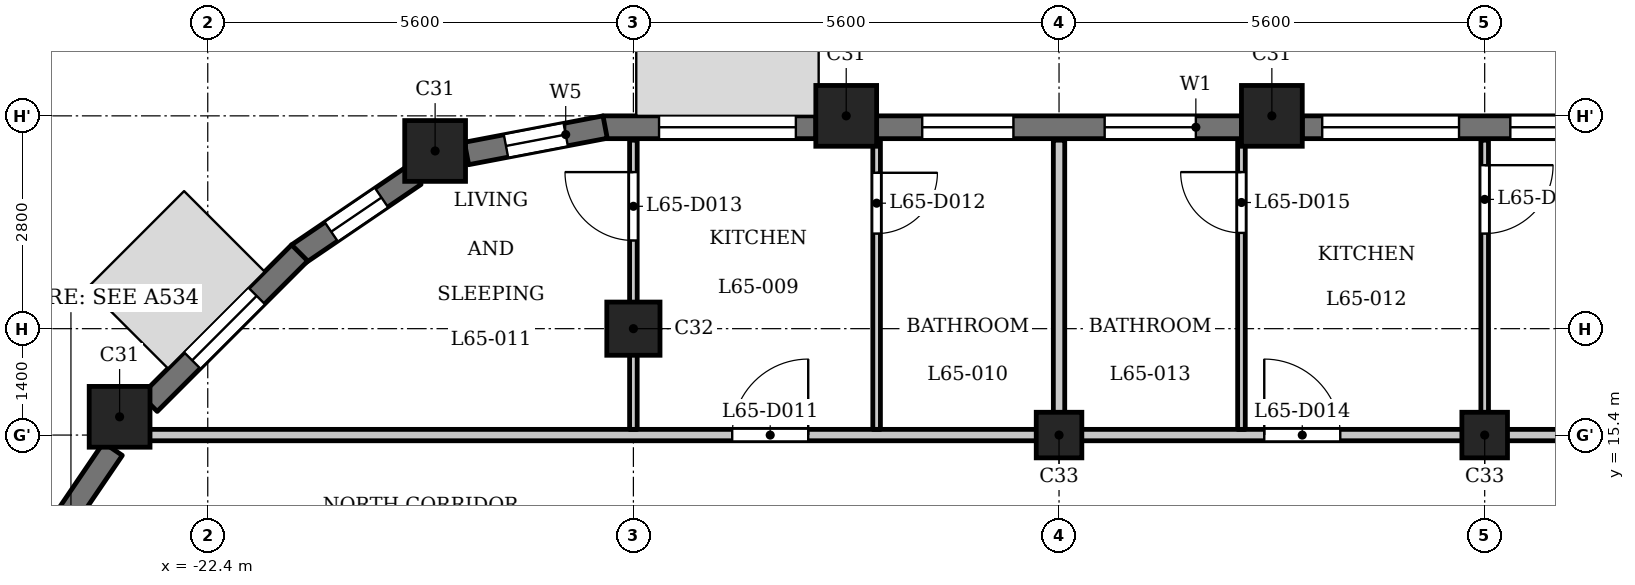
"""IFC4 building model, lengths in metres.
Left out: names, types, materials, properties, quantities, classifications, styles, units other than length and angle.
Written with IfcOpenShell. Run it as: python <this file> out.ifc"""

import sys

from ifc_helpers import new_model, si_unit, direction, frame, frame_2d, origin, origin_2d, place, context, subcontext, project, spatial, rectangle, extrude, element, fill, save


model = new_model("IFC4")
c1 = context("Model", 3, precision=1e-05, world=origin(), true_north=direction((0.0, 1.0)))
c2 = subcontext(c1, "Body", "Model", "MODEL_VIEW")
j1 = project(units=[si_unit("LENGTHUNIT", "METRE"), si_unit("PLANEANGLEUNIT", "RADIAN")], contexts=[c1])
p1 = place(None, origin())
s1 = spatial("IfcSite", under=j1, at=p1, CompositionType="ELEMENT")
p2 = place(p1, origin())
s2 = spatial("IfcBuilding", under=s1, at=p2, CompositionType="ELEMENT")
p3 = place(p2, frame((0.0, 0.0, 252.2)))
s3 = spatial("IfcBuildingStorey", under=s2, at=p3, CompositionType="ELEMENT", Elevation=252.2)
for number, where, z_axis, x_axis in (
    (1, (-8.4, 19.6, 0.0), (0.0, 0.0, 1.0), (1.0, 0.0, 0.0)),
    (2, (-14.0, 19.6, 0.0), (0.0, 0.0, 1.0), (1.0, 0.0, 0.0)),
    (3, (-19.409, 19.138, 0.0), (0.0, 0.0, 1.0), (1.0, 0.0, 0.0)),
    (4, (-23.56, 15.64, 0.0), (0.0, 0.0, 1.0), (1.0, 0.0, 0.0)),
):
    element("IfcColumn", number, at=place(p3, frame(where, z_axis=z_axis, x_axis=x_axis)), inside=s3, PredefinedType="COLUMN", context=c2, shape_type="SweptSolid", body=[
        extrude(rectangle(XDim=0.8, YDim=0.8, at=origin_2d()), origin(), (0.0, 0.0, 1.0), 3.5),
    ])
p4 = place(p3, frame((-16.8, 16.8, 0.0), z_axis=(0.0, 0.0, 1.0), x_axis=(1.0, 0.0, 0.0)))
e5 = element("IfcColumn", 5, at=p4, inside=s3, PredefinedType="COLUMN", context=c2, shape_type="SweptSolid", body=[
    extrude(rectangle(XDim=0.7, YDim=0.7, at=origin_2d()), origin(), (0.0, 0.0, 1.0), 3.5),
])
for number, where, z_axis, x_axis in (
    (6, (-11.2, 15.4, 0.0), (0.0, 0.0, 1.0), (1.0, 0.0, 0.0)),
    (7, (-5.6, 15.4, 0.0), (0.0, 0.0, 1.0), (1.0, 0.0, 0.0)),
):
    element("IfcColumn", number, at=place(p3, frame(where, z_axis=z_axis, x_axis=x_axis)), inside=s3, PredefinedType="COLUMN", context=c2, shape_type="SweptSolid", body=[
        extrude(rectangle(XDim=0.6, YDim=0.6, at=origin_2d()), origin(), (0.0, 0.0, 1.0), 3.5),
    ])
p5 = place(p3, frame((-3.2, 19.45, 0.0), z_axis=(0.0, 0.0, 1.0), x_axis=(-1.0, 0.0, 0.0)))
e8 = element("IfcWall", 8, at=p5, inside=s3, PredefinedType="SOLIDWALL", context=c2, shape_type="SweptSolid", body=[
    extrude(rectangle(XDim=4.8, YDim=0.3, at=frame_2d((2.4, 0.0))), origin(), (0.0, 0.0, 1.0), 2.55),
])
p6 = place(p5, frame((0.262, 0.0, 0.9)))
e9 = element("IfcOpeningElement", 9, at=p6, cuts=e8, PredefinedType="OPENING", context=c2, shape_type="SweptSolid", body=[
    extrude(rectangle(XDim=1.8, YDim=1.25, at=frame_2d((0.9, 0.625))), frame((0.0, 0.16, 0.0), z_axis=(0.0, -1.0, 0.0), x_axis=(1.0, 0.0, 0.0)), (0.0, 0.0, 1.0), 0.32),
])
p7 = place(p5, frame((2.738, 0.0, 0.9)))
e10 = element("IfcOpeningElement", 10, at=p7, cuts=e8, PredefinedType="OPENING", context=c2, shape_type="SweptSolid", body=[
    extrude(rectangle(XDim=1.8, YDim=1.25, at=frame_2d((0.9, 0.625))), frame((0.0, 0.16, 0.0), z_axis=(0.0, -1.0, 0.0), x_axis=(1.0, 0.0, 0.0)), (0.0, 0.0, 1.0), 0.32),
])
p8 = place(p3, frame((-8.8, 19.45, 0.0), z_axis=(0.0, 0.0, 1.0), x_axis=(-1.0, 0.0, 0.0)))
e11 = element("IfcWall", 11, at=p8, inside=s3, PredefinedType="SOLIDWALL", context=c2, shape_type="SweptSolid", body=[
    extrude(rectangle(XDim=4.8, YDim=0.3, at=frame_2d((2.4, 0.0))), origin(), (0.0, 0.0, 1.0), 2.55),
])
p9 = place(p8, frame((0.6, 0.0, 0.6)))
e12 = element("IfcOpeningElement", 12, at=p9, cuts=e11, PredefinedType="OPENING", context=c2, shape_type="SweptSolid", body=[
    extrude(rectangle(XDim=1.2, YDim=1.55, at=frame_2d((0.6, 0.775))), frame((0.0, 0.16, 0.0), z_axis=(0.0, -1.0, 0.0), x_axis=(1.0, 0.0, 0.0)), (0.0, 0.0, 1.0), 0.32),
])
p10 = place(p8, frame((3.0, 0.0, 0.6)))
e13 = element("IfcOpeningElement", 13, at=p10, cuts=e11, PredefinedType="OPENING", context=c2, shape_type="SweptSolid", body=[
    extrude(rectangle(XDim=1.2, YDim=1.55, at=frame_2d((0.6, 0.775))), frame((0.0, 0.16, 0.0), z_axis=(0.0, -1.0, 0.0), x_axis=(1.0, 0.0, 0.0)), (0.0, 0.0, 1.0), 0.32),
])
p11 = place(p3, frame((-14.4, 19.45, 0.0), z_axis=(0.0, 0.0, 1.0), x_axis=(-1.0, 0.0, 0.0)))
e14 = element("IfcWall", 14, at=p11, inside=s3, PredefinedType="SOLIDWALL", context=c2, shape_type="SweptSolid", body=[
    extrude(rectangle(XDim=2.8, YDim=0.3, at=frame_2d((1.4, 0.0))), origin(), (0.0, 0.0, 1.0), 2.55),
])
p12 = place(p11, frame((0.262, 0.0, 0.9)))
e15 = element("IfcOpeningElement", 15, at=p12, cuts=e14, PredefinedType="OPENING", context=c2, shape_type="SweptSolid", body=[
    extrude(rectangle(XDim=1.8, YDim=1.25, at=frame_2d((0.9, 0.625))), frame((0.0, 0.16, 0.0), z_axis=(0.0, -1.0, 0.0), x_axis=(1.0, 0.0, 0.0)), (0.0, 0.0, 1.0), 0.32),
])
p13 = place(p3, frame((-17.172, 19.453, 0.0), z_axis=(0.0, 0.0, 1.0), x_axis=(-0.982301706131, -0.187305520826, 0.0)))
e16 = element("IfcWall", 16, at=p13, inside=s3, PredefinedType="SOLIDWALL", context=c2, shape_type="SweptSolid", body=[
    extrude(rectangle(XDim=1.856, YDim=0.3, at=frame_2d((0.928, 0.0))), origin(), (0.0, 0.0, 1.0), 2.55),
])
p14 = place(p13, frame((0.528, 0.0, 0.6)))
e17 = element("IfcOpeningElement", 17, at=p14, cuts=e16, PredefinedType="OPENING", context=c2, shape_type="SweptSolid", body=[
    extrude(rectangle(XDim=0.8, YDim=1.55, at=frame_2d((0.4, 0.775))), frame((0.0, 0.16, 0.0), z_axis=(0.0, -1.0, 0.0), x_axis=(1.0, 0.0, 0.0)), (0.0, 0.0, 1.0), 0.32),
])
p15 = place(p3, frame((-19.678, 18.822, 0.0), z_axis=(0.0, 0.0, 1.0), x_axis=(-0.826997446962, -0.562205676526, 0.0)))
e18 = element("IfcWall", 18, at=p15, inside=s3, PredefinedType="SOLIDWALL", context=c2, shape_type="SweptSolid", body=[
    extrude(rectangle(XDim=1.856, YDim=0.3, at=frame_2d((0.928, 0.0))), origin(), (0.0, 0.0, 1.0), 2.55),
])
p16 = place(p15, frame((0.528, 0.0, 0.6)))
e19 = element("IfcOpeningElement", 19, at=p16, cuts=e18, PredefinedType="OPENING", context=c2, shape_type="SweptSolid", body=[
    extrude(rectangle(XDim=0.8, YDim=1.55, at=frame_2d((0.4, 0.775))), frame((0.0, 0.16, 0.0), z_axis=(0.0, -1.0, 0.0), x_axis=(1.0, 0.0, 0.0)), (0.0, 0.0, 1.0), 0.32),
])
p17 = place(p3, frame((-21.191, 17.797, 0.0), z_axis=(0.0, 0.0, 1.0), x_axis=(-0.707106781187, -0.707106781187, 0.0)))
e20 = element("IfcWall", 20, at=p17, inside=s3, PredefinedType="SOLIDWALL", context=c2, shape_type="SweptSolid", body=[
    extrude(rectangle(XDim=2.8, YDim=0.3, at=frame_2d((1.4, 0.0))), origin(), (0.0, 0.0, 1.0), 2.55),
])
p18 = place(p17, frame((0.8, 0.0, 0.6)))
e21 = element("IfcOpeningElement", 21, at=p18, cuts=e20, PredefinedType="OPENING", context=c2, shape_type="SweptSolid", body=[
    extrude(rectangle(XDim=1.2, YDim=1.55, at=frame_2d((0.6, 0.775))), frame((0.0, 0.16, 0.0), z_axis=(0.0, -1.0, 0.0), x_axis=(1.0, 0.0, 0.0)), (0.0, 0.0, 1.0), 0.32),
])
p19 = place(p3, frame((-23.648, 15.217, 0.0), z_axis=(0.0, 0.0, 1.0), x_axis=(-0.562043265151, -0.827107833416, 0.0)))
e22 = element("IfcWall", 22, at=p19, inside=s3, PredefinedType="SOLIDWALL", context=c2, shape_type="SweptSolid", body=[
    extrude(rectangle(XDim=1.377, YDim=0.3, at=frame_2d((0.688, 0.0))), origin(), (0.0, 0.0, 1.0), 2.55),
])
p20 = place(p3, frame((-23.55, 15.4, 0.0), z_axis=(0.0, 0.0, 1.0), x_axis=(1.0, 0.0, 0.0)))
e23 = element("IfcWall", 23, at=p20, inside=s3, PredefinedType="PARTITIONING", context=c2, shape_type="SweptSolid", body=[
    extrude(rectangle(XDim=46.872, YDim=0.15, at=frame_2d((23.436, 0.0))), origin(), (0.0, 0.0, 1.0), 3.2),
])
p21 = place(p20, frame((8.05, 0.0, 0.0)))
e24 = element("IfcOpeningElement", 24, at=p21, cuts=e23, PredefinedType="OPENING", context=c2, shape_type="SweptSolid", body=[
    extrude(rectangle(XDim=1.0, YDim=2.1, at=frame_2d((0.5, 1.05))), frame((0.0, 0.085, 0.0), z_axis=(0.0, -1.0, 0.0), x_axis=(1.0, 0.0, 0.0)), (0.0, 0.0, 1.0), 0.17),
])
p22 = place(p20, frame((15.05, 0.0, 0.0)))
e25 = element("IfcOpeningElement", 25, at=p22, cuts=e23, PredefinedType="OPENING", context=c2, shape_type="SweptSolid", body=[
    extrude(rectangle(XDim=1.0, YDim=2.1, at=frame_2d((0.5, 1.05))), frame((0.0, 0.085, 0.0), z_axis=(0.0, -1.0, 0.0), x_axis=(1.0, 0.0, 0.0)), (0.0, 0.0, 1.0), 0.17),
])
p23 = place(p20, frame((30.95, 0.0, 0.0)))
e26 = element("IfcOpeningElement", 26, at=p23, cuts=e23, PredefinedType="OPENING", context=c2, shape_type="SweptSolid", body=[
    extrude(rectangle(XDim=1.0, YDim=2.1, at=frame_2d((0.5, 1.05))), frame((0.0, 0.085, 0.0), z_axis=(0.0, -1.0, 0.0), x_axis=(1.0, 0.0, 0.0)), (0.0, 0.0, 1.0), 0.17),
])
p24 = place(p20, frame((38.2, 0.0, 0.0)))
e27 = element("IfcOpeningElement", 27, at=p24, cuts=e23, PredefinedType="OPENING", context=c2, shape_type="SweptSolid", body=[
    extrude(rectangle(XDim=1.0, YDim=2.1, at=frame_2d((0.5, 1.05))), frame((0.0, 0.085, 0.0), z_axis=(0.0, -1.0, 0.0), x_axis=(1.0, 0.0, 0.0)), (0.0, 0.0, 1.0), 0.17),
])
p25 = place(p3, frame((-16.8, 15.475, 0.0), z_axis=(0.0, 0.0, 1.0), x_axis=(0.0, 1.0, 0.0)))
e28 = element("IfcWall", 28, at=p25, inside=s3, PredefinedType="PARTITIONING", context=c2, shape_type="SweptSolid", body=[
    extrude(rectangle(XDim=3.805, YDim=0.1, at=frame_2d((1.902, 0.0))), origin(), (0.0, 0.0, 1.0), 3.2),
])
p26 = place(p25, frame((2.485, 0.0, 0.0)))
e29 = element("IfcOpeningElement", 29, at=p26, cuts=e28, PredefinedType="OPENING", context=c2, shape_type="SweptSolid", body=[
    extrude(rectangle(XDim=0.9, YDim=2.1, at=frame_2d((0.45, 1.05))), frame((0.0, 0.06, 0.0), z_axis=(0.0, -1.0, 0.0), x_axis=(1.0, 0.0, 0.0)), (0.0, 0.0, 1.0), 0.12),
])
p27 = place(p3, frame((-13.6, 15.475, 0.0), z_axis=(0.0, 0.0, 1.0), x_axis=(0.0, 1.0, 0.0)))
e30 = element("IfcWall", 30, at=p27, inside=s3, PredefinedType="PARTITIONING", context=c2, shape_type="SweptSolid", body=[
    extrude(rectangle(XDim=3.805, YDim=0.1, at=frame_2d((1.902, 0.0))), origin(), (0.0, 0.0, 1.0), 3.2),
])
p28 = place(p27, frame((2.576, 0.0, 0.0)))
e31 = element("IfcOpeningElement", 31, at=p28, cuts=e30, PredefinedType="OPENING", context=c2, shape_type="SweptSolid", body=[
    extrude(rectangle(XDim=0.8, YDim=2.1, at=frame_2d((0.4, 1.05))), frame((0.0, 0.06, 0.0), z_axis=(0.0, -1.0, 0.0), x_axis=(1.0, 0.0, 0.0)), (0.0, 0.0, 1.0), 0.12),
])
p29 = place(p3, frame((-11.2, 15.475, 0.0), z_axis=(0.0, 0.0, 1.0), x_axis=(0.0, 1.0, 0.0)))
e32 = element("IfcWall", 32, at=p29, inside=s3, PredefinedType="PARTITIONING", context=c2, shape_type="SweptSolid", body=[
    extrude(rectangle(XDim=3.805, YDim=0.15, at=frame_2d((1.902, 0.0))), origin(), (0.0, 0.0, 1.0), 3.2),
])
p30 = place(p3, frame((-8.8, 15.475, 0.0), z_axis=(0.0, 0.0, 1.0), x_axis=(0.0, 1.0, 0.0)))
e33 = element("IfcWall", 33, at=p30, inside=s3, PredefinedType="PARTITIONING", context=c2, shape_type="SweptSolid", body=[
    extrude(rectangle(XDim=3.805, YDim=0.1, at=frame_2d((1.902, 0.0))), origin(), (0.0, 0.0, 1.0), 3.2),
])
p31 = place(p30, frame((2.585, 0.0, 0.0)))
e34 = element("IfcOpeningElement", 34, at=p31, cuts=e33, PredefinedType="OPENING", context=c2, shape_type="SweptSolid", body=[
    extrude(rectangle(XDim=0.8, YDim=2.1, at=frame_2d((0.4, 1.05))), frame((0.0, 0.06, 0.0), z_axis=(0.0, -1.0, 0.0), x_axis=(1.0, 0.0, 0.0)), (0.0, 0.0, 1.0), 0.12),
])
p32 = place(p3, frame((-5.6, 15.475, 0.0), z_axis=(0.0, 0.0, 1.0), x_axis=(0.0, 1.0, 0.0)))
e35 = element("IfcWall", 35, at=p32, inside=s3, PredefinedType="PARTITIONING", context=c2, shape_type="SweptSolid", body=[
    extrude(rectangle(XDim=3.805, YDim=0.1, at=frame_2d((1.902, 0.0))), origin(), (0.0, 0.0, 1.0), 3.2),
])
p33 = place(p32, frame((2.576, 0.0, 0.0)))
e36 = element("IfcOpeningElement", 36, at=p33, cuts=e35, PredefinedType="OPENING", context=c2, shape_type="SweptSolid", body=[
    extrude(rectangle(XDim=0.9, YDim=2.1, at=frame_2d((0.45, 1.05))), frame((0.0, 0.06, 0.0), z_axis=(0.0, -1.0, 0.0), x_axis=(1.0, 0.0, 0.0)), (0.0, 0.0, 1.0), 0.12),
])
p34 = place(p21, origin())
e37 = element("IfcDoor", 37, at=p34, inside=s3, OperationType="SINGLE_SWING_LEFT", PredefinedType="DOOR", context=c2, shape_type="SweptSolid", body=[
    extrude(rectangle(XDim=1.0, YDim=2.1, at=frame_2d((0.5, 1.05))), frame((0.0, 0.025, 0.0), z_axis=(0.0, -1.0, 0.0), x_axis=(1.0, 0.0, 0.0)), (0.0, 0.0, 1.0), 0.05),
])
fill(e24, e37)
p35 = place(p28, origin())
e38 = element("IfcDoor", 38, at=p35, inside=s3, OperationType="SINGLE_SWING_RIGHT", PredefinedType="DOOR", context=c2, shape_type="SweptSolid", body=[
    extrude(rectangle(XDim=0.8, YDim=2.1, at=frame_2d((0.4, 1.05))), frame((0.0, 0.025, 0.0), z_axis=(0.0, -1.0, 0.0), x_axis=(1.0, 0.0, 0.0)), (0.0, 0.0, 1.0), 0.05),
])
fill(e31, e38)
p36 = place(p26, origin())
e39 = element("IfcDoor", 39, at=p36, inside=s3, OperationType="SINGLE_SWING_LEFT", PredefinedType="DOOR", context=c2, shape_type="SweptSolid", body=[
    extrude(rectangle(XDim=0.9, YDim=2.1, at=frame_2d((0.45, 1.05))), frame((0.0, 0.025, 0.0), z_axis=(0.0, -1.0, 0.0), x_axis=(1.0, 0.0, 0.0)), (0.0, 0.0, 1.0), 0.05),
])
fill(e29, e39)
p37 = place(p22, origin())
e40 = element("IfcDoor", 40, at=p37, inside=s3, OperationType="SINGLE_SWING_RIGHT", PredefinedType="DOOR", context=c2, shape_type="SweptSolid", body=[
    extrude(rectangle(XDim=1.0, YDim=2.1, at=frame_2d((0.5, 1.05))), frame((0.0, 0.025, 0.0), z_axis=(0.0, -1.0, 0.0), x_axis=(1.0, 0.0, 0.0)), (0.0, 0.0, 1.0), 0.05),
])
fill(e25, e40)
p38 = place(p31, origin())
e41 = element("IfcDoor", 41, at=p38, inside=s3, OperationType="SINGLE_SWING_LEFT", PredefinedType="DOOR", context=c2, shape_type="SweptSolid", body=[
    extrude(rectangle(XDim=0.8, YDim=2.1, at=frame_2d((0.4, 1.05))), frame((0.0, 0.025, 0.0), z_axis=(0.0, -1.0, 0.0), x_axis=(1.0, 0.0, 0.0)), (0.0, 0.0, 1.0), 0.05),
])
fill(e34, e41)
p39 = place(p33, origin())
e42 = element("IfcDoor", 42, at=p39, inside=s3, OperationType="SINGLE_SWING_RIGHT", PredefinedType="DOOR", context=c2, shape_type="SweptSolid", body=[
    extrude(rectangle(XDim=0.9, YDim=2.1, at=frame_2d((0.45, 1.05))), frame((0.0, 0.025, 0.0), z_axis=(0.0, -1.0, 0.0), x_axis=(1.0, 0.0, 0.0)), (0.0, 0.0, 1.0), 0.05),
])
fill(e36, e42)
p40 = place(p6, origin())
e43 = element("IfcWindow", 43, at=p40, inside=s3, PartitioningType="SINGLE_PANEL", PredefinedType="WINDOW", context=c2, shape_type="SweptSolid", body=[
    extrude(rectangle(XDim=1.8, YDim=1.25, at=frame_2d((0.9, 0.625))), frame((0.0, 0.03, 0.0), z_axis=(0.0, -1.0, 0.0), x_axis=(1.0, 0.0, 0.0)), (0.0, 0.0, 1.0), 0.06),
])
fill(e9, e43)
p41 = place(p7, origin())
e44 = element("IfcWindow", 44, at=p41, inside=s3, PartitioningType="SINGLE_PANEL", PredefinedType="WINDOW", context=c2, shape_type="SweptSolid", body=[
    extrude(rectangle(XDim=1.8, YDim=1.25, at=frame_2d((0.9, 0.625))), frame((0.0, 0.03, 0.0), z_axis=(0.0, -1.0, 0.0), x_axis=(1.0, 0.0, 0.0)), (0.0, 0.0, 1.0), 0.06),
])
fill(e10, e44)
p42 = place(p9, origin())
e45 = element("IfcWindow", 45, at=p42, inside=s3, PartitioningType="SINGLE_PANEL", PredefinedType="WINDOW", context=c2, shape_type="SweptSolid", body=[
    extrude(rectangle(XDim=1.2, YDim=1.55, at=frame_2d((0.6, 0.775))), frame((0.0, 0.03, 0.0), z_axis=(0.0, -1.0, 0.0), x_axis=(1.0, 0.0, 0.0)), (0.0, 0.0, 1.0), 0.06),
])
fill(e12, e45)
p43 = place(p10, origin())
e46 = element("IfcWindow", 46, at=p43, inside=s3, PartitioningType="SINGLE_PANEL", PredefinedType="WINDOW", context=c2, shape_type="SweptSolid", body=[
    extrude(rectangle(XDim=1.2, YDim=1.55, at=frame_2d((0.6, 0.775))), frame((0.0, 0.03, 0.0), z_axis=(0.0, -1.0, 0.0), x_axis=(1.0, 0.0, 0.0)), (0.0, 0.0, 1.0), 0.06),
])
fill(e13, e46)
p44 = place(p12, origin())
e47 = element("IfcWindow", 47, at=p44, inside=s3, PartitioningType="SINGLE_PANEL", PredefinedType="WINDOW", context=c2, shape_type="SweptSolid", body=[
    extrude(rectangle(XDim=1.8, YDim=1.25, at=frame_2d((0.9, 0.625))), frame((0.0, 0.03, 0.0), z_axis=(0.0, -1.0, 0.0), x_axis=(1.0, 0.0, 0.0)), (0.0, 0.0, 1.0), 0.06),
])
fill(e15, e47)
p45 = place(p14, origin())
e48 = element("IfcWindow", 48, at=p45, inside=s3, PartitioningType="SINGLE_PANEL", PredefinedType="WINDOW", context=c2, shape_type="SweptSolid", body=[
    extrude(rectangle(XDim=0.8, YDim=1.55, at=frame_2d((0.4, 0.775))), frame((0.0, 0.03, 0.0), z_axis=(0.0, -1.0, 0.0), x_axis=(1.0, 0.0, 0.0)), (0.0, 0.0, 1.0), 0.06),
])
fill(e17, e48)
p46 = place(p16, origin())
e49 = element("IfcWindow", 49, at=p46, inside=s3, PartitioningType="SINGLE_PANEL", PredefinedType="WINDOW", context=c2, shape_type="SweptSolid", body=[
    extrude(rectangle(XDim=0.8, YDim=1.55, at=frame_2d((0.4, 0.775))), frame((0.0, 0.03, 0.0), z_axis=(0.0, -1.0, 0.0), x_axis=(1.0, 0.0, 0.0)), (0.0, 0.0, 1.0), 0.06),
])
fill(e19, e49)
p47 = place(p18, origin())
e50 = element("IfcWindow", 50, at=p47, inside=s3, PartitioningType="SINGLE_PANEL", PredefinedType="WINDOW", context=c2, shape_type="SweptSolid", body=[
    extrude(rectangle(XDim=1.2, YDim=1.55, at=frame_2d((0.6, 0.775))), frame((0.0, 0.03, 0.0), z_axis=(0.0, -1.0, 0.0), x_axis=(1.0, 0.0, 0.0)), (0.0, 0.0, 1.0), 0.06),
])
fill(e21, e50)
save(model, sys.argv[1])
